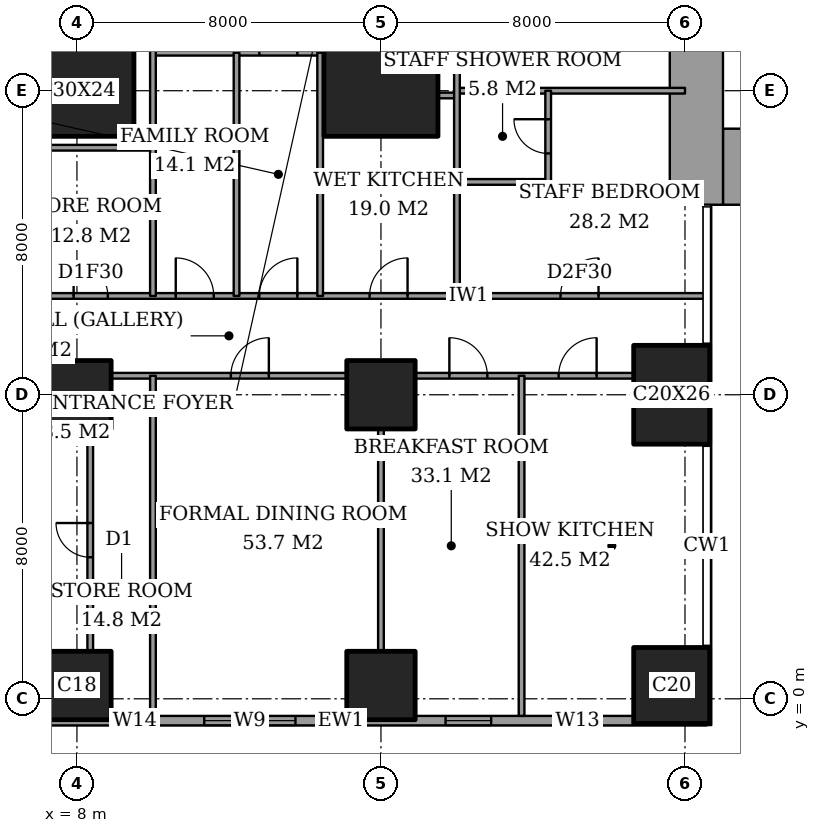
"""IFC4 building model, lengths in metres.
Left out: names, types, materials, properties, quantities, classifications, styles, units other than length and angle.
Written with IfcOpenShell. Run it as: python <this file> out.ifc"""

import sys

from ifc_helpers import new_model, si_unit, direction, frame, frame_2d, origin, origin_2d, place, context, subcontext, project, spatial, rectangle, extrude, element, fill, save


model = new_model("IFC4")
c1 = context("Model", 3, precision=1e-05, world=origin(), true_north=direction((0.0, 1.0)))
c2 = subcontext(c1, "Body", "Model", "MODEL_VIEW")
j1 = project(units=[si_unit("LENGTHUNIT", "METRE"), si_unit("PLANEANGLEUNIT", "RADIAN")], contexts=[c1])
p1 = place(None, origin())
s1 = spatial("IfcSite", under=j1, at=p1, CompositionType="ELEMENT")
p2 = place(p1, origin())
s2 = spatial("IfcBuilding", under=s1, at=p2, CompositionType="ELEMENT")
p3 = place(p2, frame((0.0, 0.0, 207.4)))
s3 = spatial("IfcBuildingStorey", under=s2, at=p3, CompositionType="ELEMENT", Elevation=207.4)
for number, where, z_axis, x_axis in (
    (1, (8.0, 0.35, 0.0), (0.0, 0.0, 1.0), (1.0, 0.0, 0.0)),
    (2, (8.0, 8.0, 0.0), (0.0, 0.0, 1.0), (1.0, 0.0, 0.0)),
):
    element("IfcColumn", number, at=place(p3, frame(where, z_axis=z_axis, x_axis=x_axis)), inside=s3, PredefinedType="COLUMN", context=c2, shape_type="SweptSolid", body=[
        extrude(rectangle(XDim=1.8, YDim=1.8, at=origin_2d()), origin(), (0.0, 0.0, 1.0), 3.6),
    ])
p4 = place(p3, frame((8.0, 16.0, 0.0), z_axis=(0.0, 0.0, 1.0), x_axis=(1.0, 0.0, 0.0)))
e3 = element("IfcColumn", 3, at=p4, inside=s3, PredefinedType="COLUMN", context=c2, shape_type="SweptSolid", body=[
    extrude(rectangle(XDim=3.0, YDim=2.4, at=origin_2d()), origin(), (0.0, 0.0, 1.0), 3.6),
])
for number, where, z_axis, x_axis in (
    (4, (16.0, 0.35, 0.0), (0.0, 0.0, 1.0), (1.0, 0.0, 0.0)),
    (5, (16.0, 8.0, 0.0), (0.0, 0.0, 1.0), (1.0, 0.0, 0.0)),
):
    element("IfcColumn", number, at=place(p3, frame(where, z_axis=z_axis, x_axis=x_axis)), inside=s3, PredefinedType="COLUMN", context=c2, shape_type="SweptSolid", body=[
        extrude(rectangle(XDim=1.8, YDim=1.8, at=origin_2d()), origin(), (0.0, 0.0, 1.0), 3.6),
    ])
p5 = place(p3, frame((16.0, 16.0, 0.0), z_axis=(0.0, 0.0, 1.0), x_axis=(1.0, 0.0, 0.0)))
e6 = element("IfcColumn", 6, at=p5, inside=s3, PredefinedType="COLUMN", context=c2, shape_type="SweptSolid", body=[
    extrude(rectangle(XDim=3.0, YDim=2.4, at=origin_2d()), origin(), (0.0, 0.0, 1.0), 3.6),
])
p6 = place(p3, frame((23.65, 0.35, 0.0), z_axis=(0.0, 0.0, 1.0), x_axis=(1.0, 0.0, 0.0)))
e7 = element("IfcColumn", 7, at=p6, inside=s3, PredefinedType="COLUMN", context=c2, shape_type="SweptSolid", body=[
    extrude(rectangle(XDim=2.0, YDim=2.0, at=origin_2d()), origin(), (0.0, 0.0, 1.0), 3.6),
])
p7 = place(p3, frame((23.65, 8.0, 0.0), z_axis=(0.0, 0.0, 1.0), x_axis=(1.0, 0.0, 0.0)))
e8 = element("IfcColumn", 8, at=p7, inside=s3, PredefinedType="COLUMN", context=c2, shape_type="SweptSolid", body=[
    extrude(rectangle(XDim=2.0, YDim=2.6, at=origin_2d()), origin(), (0.0, 0.0, 1.0), 3.6),
])
p8 = place(p3, frame((25.0, 14.0, 0.0), z_axis=(0.0, 0.0, 1.0), x_axis=(1.0, 0.0, 0.0)))
e9 = element("IfcWall", 9, at=p8, inside=s3, PredefinedType="SHEAR", context=c2, shape_type="SweptSolid", body=[
    extrude(rectangle(XDim=3.15, YDim=2.0, at=frame_2d((1.575, 0.0))), origin(), (0.0, 0.0, 1.0), 3.6),
])
p9 = place(p3, frame((24.3, 13.0, 0.0), z_axis=(0.0, 0.0, 1.0), x_axis=(0.0, 1.0, 0.0)))
e10 = element("IfcWall", 10, at=p9, inside=s3, PredefinedType="SHEAR", context=c2, shape_type="SweptSolid", body=[
    extrude(rectangle(XDim=10.15, YDim=1.4, at=frame_2d((5.075, 0.0))), origin(), (0.0, 0.0, 1.0), 3.6),
])
p10 = place(p3, frame((3.175, -0.575, 0.0), z_axis=(0.0, 0.0, 1.0), x_axis=(1.0, 0.0, 0.0)))
e11 = element("IfcWall", 11, at=p10, inside=s3, PredefinedType="SOLIDWALL", context=c2, shape_type="SweptSolid", body=[
    extrude(rectangle(XDim=21.4, YDim=0.25, at=frame_2d((10.7, 0.0))), origin(), (0.0, 0.0, 1.0), 3.6),
])
p11 = place(p10, frame((0.825, 0.0, 0.2)))
e12 = element("IfcOpeningElement", 12, at=p11, cuts=e11, PredefinedType="OPENING", context=c2, shape_type="SweptSolid", body=[
    extrude(rectangle(XDim=2.4, YDim=2.4, at=frame_2d((1.2, 1.2))), frame((0.0, 0.135, 0.0), z_axis=(0.0, -1.0, 0.0), x_axis=(1.0, 0.0, 0.0)), (0.0, 0.0, 1.0), 0.27),
])
p12 = place(p10, frame((6.05, 0.0, 0.2)))
e13 = element("IfcOpeningElement", 13, at=p12, cuts=e11, PredefinedType="OPENING", context=c2, shape_type="SweptSolid", body=[
    extrude(rectangle(XDim=0.6, YDim=2.4, at=frame_2d((0.3, 1.2))), frame((0.0, 0.135, 0.0), z_axis=(0.0, -1.0, 0.0), x_axis=(1.0, 0.0, 0.0)), (0.0, 0.0, 1.0), 0.27),
])
p13 = place(p10, frame((8.175, 0.0, 0.2)))
e14 = element("IfcOpeningElement", 14, at=p13, cuts=e11, PredefinedType="OPENING", context=c2, shape_type="SweptSolid", body=[
    extrude(rectangle(XDim=2.4, YDim=2.4, at=frame_2d((1.2, 1.2))), frame((0.0, 0.135, 0.0), z_axis=(0.0, -1.0, 0.0), x_axis=(1.0, 0.0, 0.0)), (0.0, 0.0, 1.0), 0.27),
])
p14 = place(p10, frame((14.525, 0.0, 0.2)))
e15 = element("IfcOpeningElement", 15, at=p14, cuts=e11, PredefinedType="OPENING", context=c2, shape_type="SweptSolid", body=[
    extrude(rectangle(XDim=1.2, YDim=2.4, at=frame_2d((0.6, 1.2))), frame((0.0, 0.135, 0.0), z_axis=(0.0, -1.0, 0.0), x_axis=(1.0, 0.0, 0.0)), (0.0, 0.0, 1.0), 0.27),
])
p15 = place(p10, frame((17.4, 0.0, 0.2)))
e16 = element("IfcOpeningElement", 16, at=p15, cuts=e11, PredefinedType="OPENING", context=c2, shape_type="SweptSolid", body=[
    extrude(rectangle(XDim=1.2, YDim=2.4, at=frame_2d((0.6, 1.2))), frame((0.0, 0.135, 0.0), z_axis=(0.0, -1.0, 0.0), x_axis=(1.0, 0.0, 0.0)), (0.0, 0.0, 1.0), 0.27),
])
p16 = place(p3, frame((8.9, 8.5, 0.0), z_axis=(0.0, 0.0, 1.0), x_axis=(1.0, 0.0, 0.0)))
e17 = element("IfcWall", 17, at=p16, inside=s3, PredefinedType="PARTITIONING", context=c2, shape_type="SweptSolid", body=[
    extrude(rectangle(XDim=6.2, YDim=0.15, at=frame_2d((3.1, 0.0))), origin(), (0.0, 0.0, 1.0), 3.35),
])
p17 = place(p16, frame((3.15, 0.0, 0.0)))
e18 = element("IfcOpeningElement", 18, at=p17, cuts=e17, PredefinedType="OPENING", context=c2, shape_type="SweptSolid", body=[
    extrude(rectangle(XDim=1.0, YDim=2.1, at=frame_2d((0.5, 1.05))), frame((0.0, 0.085, 0.0), z_axis=(0.0, -1.0, 0.0), x_axis=(1.0, 0.0, 0.0)), (0.0, 0.0, 1.0), 0.17),
])
p18 = place(p3, frame((16.9, 8.5, 0.0), z_axis=(0.0, 0.0, 1.0), x_axis=(1.0, 0.0, 0.0)))
e19 = element("IfcWall", 19, at=p18, inside=s3, PredefinedType="PARTITIONING", context=c2, shape_type="SweptSolid", body=[
    extrude(rectangle(XDim=5.75, YDim=0.15, at=frame_2d((2.875, 0.0))), origin(), (0.0, 0.0, 1.0), 3.35),
])
p19 = place(p18, frame((0.9, 0.0, 0.0)))
e20 = element("IfcOpeningElement", 20, at=p19, cuts=e19, PredefinedType="OPENING", context=c2, shape_type="SweptSolid", body=[
    extrude(rectangle(XDim=1.0, YDim=2.1, at=frame_2d((0.5, 1.05))), frame((0.0, 0.085, 0.0), z_axis=(0.0, -1.0, 0.0), x_axis=(1.0, 0.0, 0.0)), (0.0, 0.0, 1.0), 0.17),
])
p20 = place(p18, frame((3.775, 0.0, 0.0)))
e21 = element("IfcOpeningElement", 21, at=p20, cuts=e19, PredefinedType="OPENING", context=c2, shape_type="SweptSolid", body=[
    extrude(rectangle(XDim=1.0, YDim=2.1, at=frame_2d((0.5, 1.05))), frame((0.0, 0.085, 0.0), z_axis=(0.0, -1.0, 0.0), x_axis=(1.0, 0.0, 0.0)), (0.0, 0.0, 1.0), 0.17),
])
p21 = place(p3, frame((-0.45, 10.6, 0.0), z_axis=(0.0, 0.0, 1.0), x_axis=(1.0, 0.0, 0.0)))
e22 = element("IfcWall", 22, at=p21, inside=s3, PredefinedType="PARTITIONING", context=c2, shape_type="SweptSolid", body=[
    extrude(rectangle(XDim=25.011, YDim=0.15, at=frame_2d((12.505, 0.0))), origin(), (0.0, 0.0, 1.0), 3.35),
])
p22 = place(p21, frame((13.25, 0.0, 0.0)))
e23 = element("IfcOpeningElement", 23, at=p22, cuts=e22, PredefinedType="OPENING", context=c2, shape_type="SweptSolid", body=[
    extrude(rectangle(XDim=1.0, YDim=2.1, at=frame_2d((0.5, 1.05))), frame((0.0, 0.085, 0.0), z_axis=(0.0, -1.0, 0.0), x_axis=(1.0, 0.0, 0.0)), (0.0, 0.0, 1.0), 0.17),
])
p23 = place(p21, frame((3.087, 0.0, 0.0)))
e24 = element("IfcOpeningElement", 24, at=p23, cuts=e22, PredefinedType="OPENING", context=c2, shape_type="SweptSolid", body=[
    extrude(rectangle(XDim=1.0, YDim=2.1, at=frame_2d((0.5, 1.05))), frame((0.0, 0.085, 0.0), z_axis=(0.0, -1.0, 0.0), x_axis=(1.0, 0.0, 0.0)), (0.0, 0.0, 1.0), 0.17),
])
p24 = place(p21, frame((8.363, 0.0, 0.0)))
e25 = element("IfcOpeningElement", 25, at=p24, cuts=e22, PredefinedType="OPENING", context=c2, shape_type="SweptSolid", body=[
    extrude(rectangle(XDim=0.9, YDim=2.1, at=frame_2d((0.45, 1.05))), frame((0.0, 0.085, 0.0), z_axis=(0.0, -1.0, 0.0), x_axis=(1.0, 0.0, 0.0)), (0.0, 0.0, 1.0), 0.17),
])
p25 = place(p21, frame((11.05, 0.0, 0.0)))
e26 = element("IfcOpeningElement", 26, at=p25, cuts=e22, PredefinedType="OPENING", context=c2, shape_type="SweptSolid", body=[
    extrude(rectangle(XDim=1.0, YDim=2.1, at=frame_2d((0.5, 1.05))), frame((0.0, 0.085, 0.0), z_axis=(0.0, -1.0, 0.0), x_axis=(1.0, 0.0, 0.0)), (0.0, 0.0, 1.0), 0.17),
])
p26 = place(p21, frame((16.15, 0.0, 0.0)))
e27 = element("IfcOpeningElement", 27, at=p26, cuts=e22, PredefinedType="OPENING", context=c2, shape_type="SweptSolid", body=[
    extrude(rectangle(XDim=1.0, YDim=2.1, at=frame_2d((0.5, 1.05))), frame((0.0, 0.085, 0.0), z_axis=(0.0, -1.0, 0.0), x_axis=(1.0, 0.0, 0.0)), (0.0, 0.0, 1.0), 0.17),
])
p27 = place(p21, frame((21.175, 0.0, 0.0)))
e28 = element("IfcOpeningElement", 28, at=p27, cuts=e22, PredefinedType="OPENING", context=c2, shape_type="SweptSolid", body=[
    extrude(rectangle(XDim=1.0, YDim=2.1, at=frame_2d((0.5, 1.05))), frame((0.0, 0.085, 0.0), z_axis=(0.0, -1.0, 0.0), x_axis=(1.0, 0.0, 0.0)), (0.0, 0.0, 1.0), 0.17),
])
p28 = place(p3, frame((18.0, 13.6, 0.0), z_axis=(0.0, 0.0, 1.0), x_axis=(1.0, 0.0, 0.0)))
e29 = element("IfcWall", 29, at=p28, inside=s3, PredefinedType="PARTITIONING", context=c2, shape_type="SweptSolid", body=[
    extrude(rectangle(XDim=2.4, YDim=0.15, at=frame_2d((1.2, 0.0))), origin(), (0.0, 0.0, 1.0), 3.35),
])
p29 = place(p3, frame((6.725, 14.5, 0.0), z_axis=(0.0, 0.0, 1.0), x_axis=(1.0, 0.0, 0.0)))
e30 = element("IfcWall", 30, at=p29, inside=s3, PredefinedType="PARTITIONING", context=c2, shape_type="SweptSolid", body=[
    extrude(rectangle(XDim=3.275, YDim=0.15, at=frame_2d((1.637, 0.0))), origin(), (0.0, 0.0, 1.0), 3.35),
])
p30 = place(p3, frame((17.5, 15.875, 0.0), z_axis=(0.0, 0.0, 1.0), x_axis=(1.0, 0.0, 0.0)))
e31 = element("IfcWall", 31, at=p30, inside=s3, PredefinedType="PARTITIONING", context=c2, shape_type="SweptSolid", body=[
    extrude(rectangle(XDim=0.5, YDim=0.15, at=frame_2d((0.25, 0.0))), origin(), (0.0, 0.0, 1.0), 2.634),
])
p31 = place(p3, frame((18.0, 16.0, 0.0), z_axis=(0.0, 0.0, 1.0), x_axis=(1.0, 0.0, 0.0)))
e32 = element("IfcWall", 32, at=p31, inside=s3, PredefinedType="PARTITIONING", context=c2, shape_type="SweptSolid", body=[
    extrude(rectangle(XDim=6.0, YDim=0.15, at=frame_2d((3.0, 0.0))), origin(), (0.0, 0.0, 1.0), 2.634),
])
p32 = place(p3, frame((10.0, 17.0, 0.0), z_axis=(0.0, 0.0, 1.0), x_axis=(1.0, 0.0, 0.0)))
e33 = element("IfcWall", 33, at=p32, inside=s3, PredefinedType="PARTITIONING", context=c2, shape_type="SweptSolid", body=[
    extrude(rectangle(XDim=4.4, YDim=0.15, at=frame_2d((2.2, 0.0))), origin(), (0.0, 0.0, 1.0), 3.35),
])
p33 = place(p32, frame((2.8, 0.0, 0.0)))
e34 = element("IfcOpeningElement", 34, at=p33, cuts=e33, PredefinedType="OPENING", context=c2, shape_type="SweptSolid", body=[
    extrude(rectangle(XDim=1.0, YDim=2.1, at=frame_2d((0.5, 1.05))), frame((0.0, 0.085, 0.0), z_axis=(0.0, -1.0, 0.0), x_axis=(1.0, 0.0, 0.0)), (0.0, 0.0, 1.0), 0.17),
])
p34 = place(p3, frame((8.35, 1.25, 0.0), z_axis=(0.0, 0.0, 1.0), x_axis=(0.0, 1.0, 0.0)))
e35 = element("IfcWall", 35, at=p34, inside=s3, PredefinedType="PARTITIONING", context=c2, shape_type="SweptSolid", body=[
    extrude(rectangle(XDim=5.85, YDim=0.15, at=frame_2d((2.925, 0.0))), origin(), (0.0, 0.0, 1.0), 3.35),
])
p35 = place(p34, frame((2.475, 0.0, 0.0)))
e36 = element("IfcOpeningElement", 36, at=p35, cuts=e35, PredefinedType="OPENING", context=c2, shape_type="SweptSolid", body=[
    extrude(rectangle(XDim=0.9, YDim=2.1, at=frame_2d((0.45, 1.05))), frame((0.0, 0.085, 0.0), z_axis=(0.0, -1.0, 0.0), x_axis=(1.0, 0.0, 0.0)), (0.0, 0.0, 1.0), 0.17),
])
p36 = place(p3, frame((10.0, -0.45, 0.0), z_axis=(0.0, 0.0, 1.0), x_axis=(0.0, 1.0, 0.0)))
e37 = element("IfcWall", 37, at=p36, inside=s3, PredefinedType="PARTITIONING", context=c2, shape_type="SweptSolid", body=[
    extrude(rectangle(XDim=8.95, YDim=0.15, at=frame_2d((4.475, 0.0))), origin(), (0.0, 0.0, 1.0), 3.35),
])
p37 = place(p3, frame((10.0, 10.6, 0.0), z_axis=(0.0, 0.0, 1.0), x_axis=(0.0, 1.0, 0.0)))
e38 = element("IfcWall", 38, at=p37, inside=s3, PredefinedType="PARTITIONING", context=c2, shape_type="SweptSolid", body=[
    extrude(rectangle(XDim=11.0, YDim=0.15, at=frame_2d((5.5, 0.0))), origin(), (0.0, 0.0, 1.0), 3.35),
])
p38 = place(p37, frame((8.2, 0.0, 0.0)))
e39 = element("IfcOpeningElement", 39, at=p38, cuts=e38, PredefinedType="OPENING", context=c2, shape_type="SweptSolid", body=[
    extrude(rectangle(XDim=1.0, YDim=2.1, at=frame_2d((0.5, 1.05))), frame((0.0, 0.085, 0.0), z_axis=(0.0, -1.0, 0.0), x_axis=(1.0, 0.0, 0.0)), (0.0, 0.0, 1.0), 0.17),
])
for number, where, z_axis, x_axis in (
    (40, (12.2, 10.6, 0.0), (0.0, 0.0, 1.0), (0.0, 1.0, 0.0)),
    (41, (14.4, 10.6, 0.0), (0.0, 0.0, 1.0), (0.0, 1.0, 0.0)),
):
    element("IfcWall", number, at=place(p3, frame(where, z_axis=z_axis, x_axis=x_axis)), inside=s3, PredefinedType="PARTITIONING", context=c2, shape_type="SweptSolid", body=[
        extrude(rectangle(XDim=6.4, YDim=0.15, at=frame_2d((3.2, 0.0))), origin(), (0.0, 0.0, 1.0), 3.35),
    ])
p39 = place(p3, frame((16.0, 1.25, 0.0), z_axis=(0.0, 0.0, 1.0), x_axis=(0.0, 1.0, 0.0)))
e42 = element("IfcWall", 42, at=p39, inside=s3, PredefinedType="PARTITIONING", context=c2, shape_type="SweptSolid", body=[
    extrude(rectangle(XDim=5.85, YDim=0.15, at=frame_2d((2.925, 0.0))), origin(), (0.0, 0.0, 1.0), 3.35),
])
p40 = place(p3, frame((18.0, 10.6, 0.0), z_axis=(0.0, 0.0, 1.0), x_axis=(0.0, 1.0, 0.0)))
e43 = element("IfcWall", 43, at=p40, inside=s3, PredefinedType="PARTITIONING", context=c2, shape_type="SweptSolid", body=[
    extrude(rectangle(XDim=6.4, YDim=0.15, at=frame_2d((3.2, 0.0))), origin(), (0.0, 0.0, 1.0), 3.35),
])
p41 = place(p3, frame((19.7, -0.45, 0.0), z_axis=(0.0, 0.0, 1.0), x_axis=(0.0, 1.0, 0.0)))
e44 = element("IfcWall", 44, at=p41, inside=s3, PredefinedType="PARTITIONING", context=c2, shape_type="SweptSolid", body=[
    extrude(rectangle(XDim=8.95, YDim=0.15, at=frame_2d((4.475, 0.0))), origin(), (0.0, 0.0, 1.0), 3.35),
])
p42 = place(p3, frame((20.4, 13.6, 0.0), z_axis=(0.0, 0.0, 1.0), x_axis=(0.0, 1.0, 0.0)))
e45 = element("IfcWall", 45, at=p42, inside=s3, PredefinedType="PARTITIONING", context=c2, shape_type="SweptSolid", body=[
    extrude(rectangle(XDim=2.4, YDim=0.15, at=frame_2d((1.2, 0.0))), origin(), (0.0, 0.0, 1.0), 3.35),
])
p43 = place(p42, frame((0.75, 0.0, 0.0)))
e46 = element("IfcOpeningElement", 46, at=p43, cuts=e45, PredefinedType="OPENING", context=c2, shape_type="SweptSolid", body=[
    extrude(rectangle(XDim=0.9, YDim=2.1, at=frame_2d((0.45, 1.05))), frame((0.0, 0.085, 0.0), z_axis=(0.0, -1.0, 0.0), x_axis=(1.0, 0.0, 0.0)), (0.0, 0.0, 1.0), 0.17),
])
p44 = place(p12, origin())
e47 = element("IfcWindow", 47, at=p44, inside=s3, PartitioningType="SINGLE_PANEL", PredefinedType="WINDOW", context=c2, shape_type="SweptSolid", body=[
    extrude(rectangle(XDim=0.6, YDim=2.4, at=frame_2d((0.3, 1.2))), frame((0.0, 0.03, 0.0), z_axis=(0.0, -1.0, 0.0), x_axis=(1.0, 0.0, 0.0)), (0.0, 0.0, 1.0), 0.06),
])
fill(e13, e47)
p45 = place(p13, origin())
e48 = element("IfcWindow", 48, at=p45, inside=s3, PartitioningType="SINGLE_PANEL", PredefinedType="WINDOW", context=c2, shape_type="SweptSolid", body=[
    extrude(rectangle(XDim=2.4, YDim=2.4, at=frame_2d((1.2, 1.2))), frame((0.0, 0.03, 0.0), z_axis=(0.0, -1.0, 0.0), x_axis=(1.0, 0.0, 0.0)), (0.0, 0.0, 1.0), 0.06),
])
fill(e14, e48)
p46 = place(p14, origin())
e49 = element("IfcWindow", 49, at=p46, inside=s3, PartitioningType="SINGLE_PANEL", PredefinedType="WINDOW", context=c2, shape_type="SweptSolid", body=[
    extrude(rectangle(XDim=1.2, YDim=2.4, at=frame_2d((0.6, 1.2))), frame((0.0, 0.03, 0.0), z_axis=(0.0, -1.0, 0.0), x_axis=(1.0, 0.0, 0.0)), (0.0, 0.0, 1.0), 0.06),
])
fill(e15, e49)
p47 = place(p15, origin())
e50 = element("IfcWindow", 50, at=p47, inside=s3, PartitioningType="SINGLE_PANEL", PredefinedType="WINDOW", context=c2, shape_type="SweptSolid", body=[
    extrude(rectangle(XDim=1.2, YDim=2.4, at=frame_2d((0.6, 1.2))), frame((0.0, 0.03, 0.0), z_axis=(0.0, -1.0, 0.0), x_axis=(1.0, 0.0, 0.0)), (0.0, 0.0, 1.0), 0.06),
])
fill(e16, e50)
p48 = place(p35, origin())
e51 = element("IfcDoor", 51, at=p48, inside=s3, OperationType="SINGLE_SWING_LEFT", PredefinedType="DOOR", context=c2, shape_type="SweptSolid", body=[
    extrude(rectangle(XDim=0.9, YDim=2.1, at=frame_2d((0.45, 1.05))), frame((0.0, 0.025, 0.0), z_axis=(0.0, -1.0, 0.0), x_axis=(1.0, 0.0, 0.0)), (0.0, 0.0, 1.0), 0.05),
])
fill(e36, e51)
p49 = place(p17, origin())
e52 = element("IfcDoor", 52, at=p49, inside=s3, OperationType="SINGLE_SWING_LEFT", PredefinedType="DOOR", context=c2, shape_type="SweptSolid", body=[
    extrude(rectangle(XDim=1.0, YDim=2.1, at=frame_2d((0.5, 1.05))), frame((0.0, 0.025, 0.0), z_axis=(0.0, -1.0, 0.0), x_axis=(1.0, 0.0, 0.0)), (0.0, 0.0, 1.0), 0.05),
])
fill(e18, e52)
p50 = place(p19, origin())
e53 = element("IfcDoor", 53, at=p50, inside=s3, OperationType="SINGLE_SWING_RIGHT", PredefinedType="DOOR", context=c2, shape_type="SweptSolid", body=[
    extrude(rectangle(XDim=1.0, YDim=2.1, at=frame_2d((0.5, 1.05))), frame((0.0, 0.025, 0.0), z_axis=(0.0, -1.0, 0.0), x_axis=(1.0, 0.0, 0.0)), (0.0, 0.0, 1.0), 0.05),
])
fill(e20, e53)
p51 = place(p20, origin())
e54 = element("IfcDoor", 54, at=p51, inside=s3, OperationType="SINGLE_SWING_LEFT", PredefinedType="DOOR", context=c2, shape_type="SweptSolid", body=[
    extrude(rectangle(XDim=1.0, YDim=2.1, at=frame_2d((0.5, 1.05))), frame((0.0, 0.025, 0.0), z_axis=(0.0, -1.0, 0.0), x_axis=(1.0, 0.0, 0.0)), (0.0, 0.0, 1.0), 0.05),
])
fill(e21, e54)
p52 = place(p22, origin())
e55 = element("IfcDoor", 55, at=p52, inside=s3, OperationType="SINGLE_SWING_LEFT", PredefinedType="DOOR", context=c2, shape_type="SweptSolid", body=[
    extrude(rectangle(XDim=1.0, YDim=2.1, at=frame_2d((0.5, 1.05))), frame((0.0, 0.025, 0.0), z_axis=(0.0, -1.0, 0.0), x_axis=(1.0, 0.0, 0.0)), (0.0, 0.0, 1.0), 0.05),
])
fill(e23, e55)
p53 = place(p24, origin())
e56 = element("IfcDoor", 56, at=p53, inside=s3, OperationType="SINGLE_SWING_RIGHT", PredefinedType="DOOR", context=c2, shape_type="SweptSolid", body=[
    extrude(rectangle(XDim=0.9, YDim=2.1, at=frame_2d((0.45, 1.05))), frame((0.0, 0.025, 0.0), z_axis=(0.0, -1.0, 0.0), x_axis=(1.0, 0.0, 0.0)), (0.0, 0.0, 1.0), 0.05),
])
fill(e25, e56)
p54 = place(p25, origin())
e57 = element("IfcDoor", 57, at=p54, inside=s3, OperationType="SINGLE_SWING_RIGHT", PredefinedType="DOOR", context=c2, shape_type="SweptSolid", body=[
    extrude(rectangle(XDim=1.0, YDim=2.1, at=frame_2d((0.5, 1.05))), frame((0.0, 0.025, 0.0), z_axis=(0.0, -1.0, 0.0), x_axis=(1.0, 0.0, 0.0)), (0.0, 0.0, 1.0), 0.05),
])
fill(e26, e57)
p55 = place(p33, origin())
e58 = element("IfcDoor", 58, at=p55, inside=s3, OperationType="SINGLE_SWING_LEFT", PredefinedType="DOOR", context=c2, shape_type="SweptSolid", body=[
    extrude(rectangle(XDim=1.0, YDim=2.1, at=frame_2d((0.5, 1.05))), frame((0.0, 0.025, 0.0), z_axis=(0.0, -1.0, 0.0), x_axis=(1.0, 0.0, 0.0)), (0.0, 0.0, 1.0), 0.05),
])
fill(e34, e58)
p56 = place(p26, origin())
e59 = element("IfcDoor", 59, at=p56, inside=s3, OperationType="SINGLE_SWING_LEFT", PredefinedType="DOOR", context=c2, shape_type="SweptSolid", body=[
    extrude(rectangle(XDim=1.0, YDim=2.1, at=frame_2d((0.5, 1.05))), frame((0.0, 0.025, 0.0), z_axis=(0.0, -1.0, 0.0), x_axis=(1.0, 0.0, 0.0)), (0.0, 0.0, 1.0), 0.05),
])
fill(e27, e59)
p57 = place(p43, origin())
e60 = element("IfcDoor", 60, at=p57, inside=s3, OperationType="SINGLE_SWING_LEFT", PredefinedType="DOOR", context=c2, shape_type="SweptSolid", body=[
    extrude(rectangle(XDim=0.9, YDim=2.1, at=frame_2d((0.45, 1.05))), frame((0.0, 0.025, 0.0), z_axis=(0.0, -1.0, 0.0), x_axis=(1.0, 0.0, 0.0)), (0.0, 0.0, 1.0), 0.05),
])
fill(e46, e60)
p58 = place(p27, origin())
e61 = element("IfcDoor", 61, at=p58, inside=s3, OperationType="SINGLE_SWING_LEFT", PredefinedType="DOOR", context=c2, shape_type="SweptSolid", body=[
    extrude(rectangle(XDim=1.0, YDim=2.1, at=frame_2d((0.5, 1.05))), frame((0.0, 0.025, 0.0), z_axis=(0.0, -1.0, 0.0), x_axis=(1.0, 0.0, 0.0)), (0.0, 0.0, 1.0), 0.05),
])
fill(e28, e61)
save(model, sys.argv[1])
